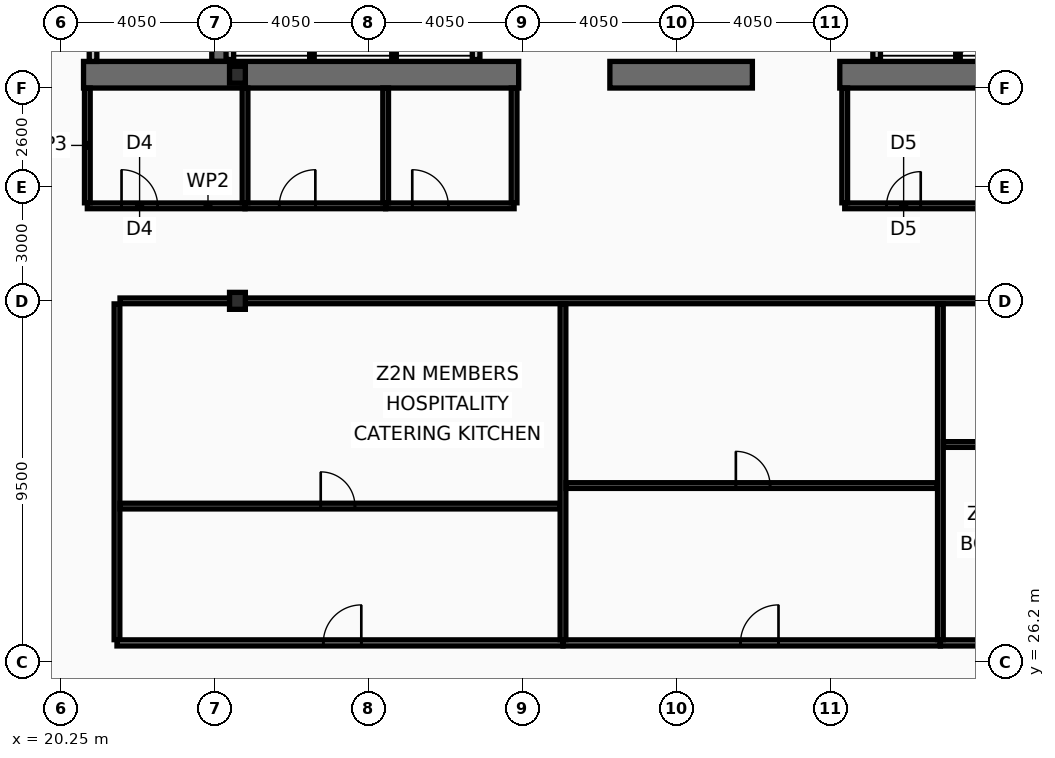
"""IFC4 building model, lengths in metres.
Left out: names, types, materials, properties, quantities, classifications, styles, units other than length and angle.
Written with IfcOpenShell. Run it as: python <this file> out.ifc"""

import sys

from ifc_helpers import new_model, si_unit, direction, frame, frame_2d, origin, origin_2d, place, context, subcontext, project, spatial, rectangle, i_section, extrude, element, fill, save


model = new_model("IFC4")
c1 = context("Model", 3, precision=1e-05, world=origin(), true_north=direction((0.0, 1.0)))
c2 = subcontext(c1, "Body", "Model", "MODEL_VIEW")
j1 = project(units=[si_unit("LENGTHUNIT", "METRE"), si_unit("PLANEANGLEUNIT", "RADIAN")], contexts=[c1])
p1 = place(None, origin())
s1 = spatial("IfcSite", under=j1, at=p1, CompositionType="ELEMENT")
p2 = place(p1, origin())
s2 = spatial("IfcBuilding", under=s1, at=p2, CompositionType="ELEMENT")
p3 = place(p2, frame((0.0, 0.0, 143.4)))
s3 = spatial("IfcBuildingStorey", under=s2, at=p3, CompositionType="ELEMENT", Elevation=143.4)
p4 = place(p3, frame((24.45, 42.0, 0.0), z_axis=(0.0, 0.0, 1.0), x_axis=(0.0, 1.0, 0.0)))
e1 = element("IfcWall", 1, at=p4, inside=s3, PredefinedType="SHEAR", context=c2, shape_type="SweptSolid", body=[
    extrude(rectangle(XDim=11.0, YDim=0.45, at=frame_2d((5.5, 0.0))), origin(), (0.0, 0.0, 1.0), 3.44),
])
p5 = place(p3, frame((32.3, 41.65, 0.0), z_axis=(0.0, 0.0, 1.0), x_axis=(-1.0, 0.0, 0.0)))
e2 = element("IfcWall", 2, at=p5, inside=s3, PredefinedType="SHEAR", context=c2, shape_type="SweptSolid", body=[
    extrude(rectangle(XDim=11.45, YDim=0.7, at=frame_2d((5.725, 0.0))), origin(), (0.0, 0.0, 1.0), 3.44),
])
p6 = place(p3, frame((38.45, 41.65, 0.0), z_axis=(0.0, 0.0, 1.0), x_axis=(-1.0, 0.0, 0.0)))
e3 = element("IfcWall", 3, at=p6, inside=s3, PredefinedType="SHEAR", context=c2, shape_type="SweptSolid", body=[
    extrude(rectangle(XDim=3.75, YDim=0.7, at=frame_2d((1.875, 0.0))), origin(), (0.0, 0.0, 1.0), 3.44),
])
p7 = place(p3, frame((52.05, 41.65, 0.0), z_axis=(0.0, 0.0, 1.0), x_axis=(-1.0, 0.0, 0.0)))
e4 = element("IfcWall", 4, at=p7, inside=s3, PredefinedType="SHEAR", context=c2, shape_type="SweptSolid", body=[
    extrude(rectangle(XDim=11.3, YDim=0.7, at=frame_2d((5.65, 0.0))), origin(), (0.0, 0.0, 1.0), 3.44),
])
for number, where, z_axis, x_axis in (
    (5, (24.9, 35.7, 0.0), (0.0, 0.0, 1.0), (1.0, 0.0, 0.0)),
    (6, (24.9, 41.65, 0.0), (0.0, 0.0, 1.0), (1.0, 0.0, 0.0)),
):
    element("IfcColumn", number, at=place(p3, frame(where, z_axis=z_axis, x_axis=x_axis)), inside=s3, PredefinedType="COLUMN", context=c2, shape_type="SweptSolid", body=[
        extrude(i_section(OverallWidth=0.416, OverallDepth=0.446, WebThickness=0.039, FlangeThickness=0.063, at=origin_2d()), origin(), (0.0, 0.0, 1.0), 3.6),
    ])
p8 = place(p3, frame((21.1, 42.0, 0.0), z_axis=(0.0, 0.0, 1.0), x_axis=(0.0, 1.0, 0.0)))
e7 = element("IfcWall", 7, at=p8, inside=s3, PredefinedType="PARTITIONING", context=c2, shape_type="SweptSolid", body=[
    extrude(rectangle(XDim=2.495, YDim=0.2, at=frame_2d((1.248, 0.0))), origin(), (0.0, 0.0, 1.0), 3.44),
])
p9 = place(p8, frame((0.38, 0.0, 0.0)))
e8 = element("IfcOpeningElement", 8, at=p9, cuts=e7, PredefinedType="OPENING", context=c2, shape_type="SweptSolid", body=[
    extrude(rectangle(XDim=1.05, YDim=2.15, at=frame_2d((0.525, 1.075))), frame((0.0, 0.11, 0.0), z_axis=(0.0, -1.0, 0.0), x_axis=(1.0, 0.0, 0.0)), (0.0, 0.0, 1.0), 0.22),
])
for number, where, z_axis, x_axis in (
    (9, (24.7, 42.05, 0.0), (0.0, 0.0, 1.0), (0.0, 1.0, 0.0)),
    (10, (31.18, 42.05, 0.0), (0.0, 0.0, 1.0), (0.0, 1.0, 0.0)),
):
    element("IfcWall", number, at=place(p3, frame(where, z_axis=z_axis, x_axis=x_axis)), inside=s3, PredefinedType="PARTITIONING", context=c2, shape_type="SweptSolid", body=[
        extrude(rectangle(XDim=2.2, YDim=0.2, at=frame_2d((1.1, 0.0))), origin(), (0.0, 0.0, 1.0), 3.44),
    ])
for number, where, z_axis, x_axis in (
    (11, (26.86, 42.05, 0.0), (0.0, 0.0, 1.0), (0.0, 1.0, 0.0)),
    (12, (29.02, 42.05, 0.0), (0.0, 0.0, 1.0), (0.0, 1.0, 0.0)),
):
    element("IfcWall", number, at=place(p3, frame(where, z_axis=z_axis, x_axis=x_axis)), inside=s3, PredefinedType="PARTITIONING", context=c2, shape_type="SweptSolid", body=[
        extrude(rectangle(XDim=2.2, YDim=0.12, at=frame_2d((1.1, 0.0))), origin(), (0.0, 0.0, 1.0), 3.44),
    ])
p10 = place(p3, frame((41.72, 42.05, 0.0), z_axis=(0.0, 0.0, 1.0), x_axis=(0.0, 1.0, 0.0)))
e13 = element("IfcWall", 13, at=p10, inside=s3, PredefinedType="PARTITIONING", context=c2, shape_type="SweptSolid", body=[
    extrude(rectangle(XDim=2.195, YDim=0.2, at=frame_2d((1.098, 0.0))), origin(), (0.0, 0.0, 1.0), 3.44),
])
p11 = place(p3, frame((43.86, 42.05, 0.0), z_axis=(0.0, 0.0, 1.0), x_axis=(0.0, 1.0, 0.0)))
e14 = element("IfcWall", 14, at=p11, inside=s3, PredefinedType="PARTITIONING", context=c2, shape_type="SweptSolid", body=[
    extrude(rectangle(XDim=2.195, YDim=0.12, at=frame_2d((1.098, 0.0))), origin(), (0.0, 0.0, 1.0), 3.44),
])
p12 = place(p3, frame((20.95, 38.2, 0.0), z_axis=(0.0, 0.0, 1.0), x_axis=(1.0, 0.0, 0.0)))
e15 = element("IfcWall", 15, at=p12, inside=s3, PredefinedType="PARTITIONING", context=c2, shape_type="SweptSolid", body=[
    extrude(rectangle(XDim=4.15, YDim=0.15, at=frame_2d((2.075, 0.0))), origin(), (0.0, 0.0, 1.0), 2.73),
])
p13 = place(p12, frame((0.9, 0.0, 0.0)))
e16 = element("IfcOpeningElement", 16, at=p13, cuts=e15, PredefinedType="OPENING", context=c2, shape_type="SweptSolid", body=[
    extrude(rectangle(XDim=0.95, YDim=2.05, at=frame_2d((0.475, 1.025))), frame((0.0, 0.085, 0.0), z_axis=(0.0, -1.0, 0.0), x_axis=(1.0, 0.0, 0.0)), (0.0, 0.0, 1.0), 0.17),
])
p14 = place(p3, frame((25.1, 38.2, 0.0), z_axis=(0.0, 0.0, 1.0), x_axis=(1.0, 0.0, 0.0)))
e17 = element("IfcWall", 17, at=p14, inside=s3, PredefinedType="PARTITIONING", context=c2, shape_type="SweptSolid", body=[
    extrude(rectangle(XDim=3.7, YDim=0.15, at=frame_2d((1.85, 0.0))), origin(), (0.0, 0.0, 1.0), 2.73),
])
p15 = place(p14, frame((0.9, 0.0, 0.0)))
e18 = element("IfcOpeningElement", 18, at=p15, cuts=e17, PredefinedType="OPENING", context=c2, shape_type="SweptSolid", body=[
    extrude(rectangle(XDim=0.95, YDim=2.05, at=frame_2d((0.475, 1.025))), frame((0.0, 0.085, 0.0), z_axis=(0.0, -1.0, 0.0), x_axis=(1.0, 0.0, 0.0)), (0.0, 0.0, 1.0), 0.17),
])
p16 = place(p3, frame((28.8, 38.2, 0.0), z_axis=(0.0, 0.0, 1.0), x_axis=(1.0, 0.0, 0.0)))
e19 = element("IfcWall", 19, at=p16, inside=s3, PredefinedType="PARTITIONING", context=c2, shape_type="SweptSolid", body=[
    extrude(rectangle(XDim=3.38, YDim=0.15, at=frame_2d((1.69, 0.0))), origin(), (0.0, 0.0, 1.0), 2.73),
])
p17 = place(p16, frame((0.7, 0.0, 0.0)))
e20 = element("IfcOpeningElement", 20, at=p17, cuts=e19, PredefinedType="OPENING", context=c2, shape_type="SweptSolid", body=[
    extrude(rectangle(XDim=0.95, YDim=2.05, at=frame_2d((0.475, 1.025))), frame((0.0, 0.085, 0.0), z_axis=(0.0, -1.0, 0.0), x_axis=(1.0, 0.0, 0.0)), (0.0, 0.0, 1.0), 0.17),
])
p18 = place(p3, frame((20.95, 38.28, 0.0), z_axis=(0.0, 0.0, 1.0), x_axis=(0.0, 1.0, 0.0)))
e21 = element("IfcWall", 21, at=p18, inside=s3, PredefinedType="PARTITIONING", context=c2, shape_type="SweptSolid", body=[
    extrude(rectangle(XDim=3.02, YDim=0.15, at=frame_2d((1.51, 0.0))), origin(), (0.0, 0.0, 1.0), 3.44),
])
p19 = place(p3, frame((25.1, 38.28, 0.0), z_axis=(0.0, 0.0, 1.0), x_axis=(0.0, 1.0, 0.0)))
e22 = element("IfcWall", 22, at=p19, inside=s3, PredefinedType="PARTITIONING", context=c2, shape_type="SweptSolid", body=[
    extrude(rectangle(XDim=3.02, YDim=0.15, at=frame_2d((1.51, 0.0))), origin(), (0.0, 0.0, 1.0), 2.73),
])
for number, where, z_axis, x_axis in (
    (23, (28.8, 38.28, 0.0), (0.0, 0.0, 1.0), (0.0, 1.0, 0.0)),
    (24, (32.18, 38.28, 0.0), (0.0, 0.0, 1.0), (0.0, 1.0, 0.0)),
):
    element("IfcWall", number, at=place(p3, frame(where, z_axis=z_axis, x_axis=x_axis)), inside=s3, PredefinedType="PARTITIONING", context=c2, shape_type="SweptSolid", body=[
        extrude(rectangle(XDim=3.02, YDim=0.15, at=frame_2d((1.51, 0.0))), origin(), (0.0, 0.0, 1.0), 3.44),
    ])
p20 = place(p3, frame((40.88, 38.2, 0.0), z_axis=(0.0, 0.0, 1.0), x_axis=(1.0, 0.0, 0.0)))
e25 = element("IfcWall", 25, at=p20, inside=s3, PredefinedType="PARTITIONING", context=c2, shape_type="SweptSolid", body=[
    extrude(rectangle(XDim=6.92, YDim=0.15, at=frame_2d((3.46, 0.0))), origin(), (0.0, 0.0, 1.0), 2.73),
])
p21 = place(p20, frame((1.1, 0.0, 0.0)))
e26 = element("IfcOpeningElement", 26, at=p21, cuts=e25, PredefinedType="OPENING", context=c2, shape_type="SweptSolid", body=[
    extrude(rectangle(XDim=0.9, YDim=2.05, at=frame_2d((0.45, 1.025))), frame((0.0, 0.085, 0.0), z_axis=(0.0, -1.0, 0.0), x_axis=(1.0, 0.0, 0.0)), (0.0, 0.0, 1.0), 0.17),
])
p22 = place(p3, frame((40.88, 38.28, 0.0), z_axis=(0.0, 0.0, 1.0), x_axis=(0.0, 1.0, 0.0)))
e27 = element("IfcWall", 27, at=p22, inside=s3, PredefinedType="PARTITIONING", context=c2, shape_type="SweptSolid", body=[
    extrude(rectangle(XDim=3.02, YDim=0.15, at=frame_2d((1.51, 0.0))), origin(), (0.0, 0.0, 1.0), 3.44),
])
p23 = place(p3, frame((21.73, 26.785, 0.0), z_axis=(0.0, 0.0, 1.0), x_axis=(0.0, 1.0, 0.0)))
e28 = element("IfcWall", 28, at=p23, inside=s3, PredefinedType="PARTITIONING", context=c2, shape_type="SweptSolid", body=[
    extrude(rectangle(XDim=8.835, YDim=0.15, at=frame_2d((4.417, 0.0))), origin(), (0.0, 0.0, 1.0), 2.93),
])
p24 = place(p3, frame((21.81, 35.7, 0.0), z_axis=(0.0, 0.0, 1.0), x_axis=(1.0, 0.0, 0.0)))
e29 = element("IfcWall", 29, at=p24, inside=s3, PredefinedType="PARTITIONING", context=c2, shape_type="SweptSolid", body=[
    extrude(rectangle(XDim=44.995, YDim=0.15, at=frame_2d((22.498, 0.0))), origin(), (0.0, 0.0, 1.0), 2.73),
])
p25 = place(p3, frame((21.73, 26.7, 0.0), z_axis=(0.0, 0.0, 1.0), x_axis=(1.0, 0.0, 0.0)))
e30 = element("IfcWall", 30, at=p25, inside=s3, PredefinedType="PARTITIONING", context=c2, shape_type="SweptSolid", body=[
    extrude(rectangle(XDim=11.736, YDim=0.16, at=frame_2d((5.868, 0.0))), origin(), (0.0, 0.0, 1.0), 2.73),
])
p26 = place(p25, frame((5.429, 0.0, 0.0)))
e31 = element("IfcOpeningElement", 31, at=p26, cuts=e30, PredefinedType="OPENING", context=c2, shape_type="SweptSolid", body=[
    extrude(rectangle(XDim=1.0, YDim=2.05, at=frame_2d((0.5, 1.025))), frame((0.0, 0.09, 0.0), z_axis=(0.0, -1.0, 0.0), x_axis=(1.0, 0.0, 0.0)), (0.0, 0.0, 1.0), 0.18),
])
p27 = place(p3, frame((21.81, 30.3, 0.0), z_axis=(0.0, 0.0, 1.0), x_axis=(1.0, 0.0, 0.0)))
e32 = element("IfcWall", 32, at=p27, inside=s3, PredefinedType="PARTITIONING", context=c2, shape_type="SweptSolid", body=[
    extrude(rectangle(XDim=11.576, YDim=0.15, at=frame_2d((5.788, 0.0))), origin(), (0.0, 0.0, 1.0), 2.73),
])
p28 = place(p27, frame((5.281, 0.0, 0.0)))
e33 = element("IfcOpeningElement", 33, at=p28, cuts=e32, PredefinedType="OPENING", context=c2, shape_type="SweptSolid", body=[
    extrude(rectangle(XDim=0.9, YDim=2.05, at=frame_2d((0.45, 1.025))), frame((0.0, 0.085, 0.0), z_axis=(0.0, -1.0, 0.0), x_axis=(1.0, 0.0, 0.0)), (0.0, 0.0, 1.0), 0.17),
])
p29 = place(p3, frame((33.466, 26.7, 0.0), z_axis=(0.0, 0.0, 1.0), x_axis=(1.0, 0.0, 0.0)))
e34 = element("IfcWall", 34, at=p29, inside=s3, PredefinedType="PARTITIONING", context=c2, shape_type="SweptSolid", body=[
    extrude(rectangle(XDim=9.931, YDim=0.16, at=frame_2d((4.965, 0.0))), origin(), (0.0, 0.0, 1.0), 2.73),
])
p30 = place(p29, frame((4.671, 0.0, 0.0)))
e35 = element("IfcOpeningElement", 35, at=p30, cuts=e34, PredefinedType="OPENING", context=c2, shape_type="SweptSolid", body=[
    extrude(rectangle(XDim=1.0, YDim=2.05, at=frame_2d((0.5, 1.025))), frame((0.0, 0.09, 0.0), z_axis=(0.0, -1.0, 0.0), x_axis=(1.0, 0.0, 0.0)), (0.0, 0.0, 1.0), 0.18),
])
p31 = place(p3, frame((33.466, 26.785, 0.0), z_axis=(0.0, 0.0, 1.0), x_axis=(0.0, 1.0, 0.0)))
e36 = element("IfcWall", 36, at=p31, inside=s3, PredefinedType="PARTITIONING", context=c2, shape_type="SweptSolid", body=[
    extrude(rectangle(XDim=8.835, YDim=0.15, at=frame_2d((4.417, 0.0))), origin(), (0.0, 0.0, 1.0), 2.93),
])
p32 = place(p3, frame((33.546, 30.84, 0.0), z_axis=(0.0, 0.0, 1.0), x_axis=(1.0, 0.0, 0.0)))
e37 = element("IfcWall", 37, at=p32, inside=s3, PredefinedType="PARTITIONING", context=c2, shape_type="SweptSolid", body=[
    extrude(rectangle(XDim=9.771, YDim=0.15, at=frame_2d((4.885, 0.0))), origin(), (0.0, 0.0, 1.0), 2.73),
])
p33 = place(p32, frame((4.469, 0.0, 0.0)))
e38 = element("IfcOpeningElement", 38, at=p33, cuts=e37, PredefinedType="OPENING", context=c2, shape_type="SweptSolid", body=[
    extrude(rectangle(XDim=0.9, YDim=2.05, at=frame_2d((0.45, 1.025))), frame((0.0, 0.085, 0.0), z_axis=(0.0, -1.0, 0.0), x_axis=(1.0, 0.0, 0.0)), (0.0, 0.0, 1.0), 0.17),
])
p34 = place(p3, frame((43.397, 26.7, 0.0), z_axis=(0.0, 0.0, 1.0), x_axis=(1.0, 0.0, 0.0)))
e39 = element("IfcWall", 39, at=p34, inside=s3, PredefinedType="PARTITIONING", context=c2, shape_type="SweptSolid", body=[
    extrude(rectangle(XDim=10.833, YDim=0.16, at=frame_2d((5.417, 0.0))), origin(), (0.0, 0.0, 1.0), 2.73),
])
p35 = place(p34, frame((5.05, 0.0, 0.0)))
e40 = element("IfcOpeningElement", 40, at=p35, cuts=e39, PredefinedType="OPENING", context=c2, shape_type="SweptSolid", body=[
    extrude(rectangle(XDim=1.0, YDim=2.05, at=frame_2d((0.5, 1.025))), frame((0.0, 0.09, 0.0), z_axis=(0.0, -1.0, 0.0), x_axis=(1.0, 0.0, 0.0)), (0.0, 0.0, 1.0), 0.18),
])
p36 = place(p3, frame((43.397, 26.785, 0.0), z_axis=(0.0, 0.0, 1.0), x_axis=(0.0, 1.0, 0.0)))
e41 = element("IfcWall", 41, at=p36, inside=s3, PredefinedType="PARTITIONING", context=c2, shape_type="SweptSolid", body=[
    extrude(rectangle(XDim=8.835, YDim=0.15, at=frame_2d((4.417, 0.0))), origin(), (0.0, 0.0, 1.0), 2.93),
])
p37 = place(p3, frame((43.477, 31.92, 0.0), z_axis=(0.0, 0.0, 1.0), x_axis=(1.0, 0.0, 0.0)))
e42 = element("IfcWall", 42, at=p37, inside=s3, PredefinedType="PARTITIONING", context=c2, shape_type="SweptSolid", body=[
    extrude(rectangle(XDim=10.674, YDim=0.15, at=frame_2d((5.337, 0.0))), origin(), (0.0, 0.0, 1.0), 2.73),
])
p38 = place(p37, frame((4.875, 0.0, 0.0)))
e43 = element("IfcOpeningElement", 43, at=p38, cuts=e42, PredefinedType="OPENING", context=c2, shape_type="SweptSolid", body=[
    extrude(rectangle(XDim=0.9, YDim=2.05, at=frame_2d((0.45, 1.025))), frame((0.0, 0.085, 0.0), z_axis=(0.0, -1.0, 0.0), x_axis=(1.0, 0.0, 0.0)), (0.0, 0.0, 1.0), 0.17),
])
p39 = place(p13, origin())
e44 = element("IfcDoor", 44, at=p39, inside=s3, OperationType="SINGLE_SWING_LEFT", PredefinedType="DOOR", context=c2, shape_type="SweptSolid", body=[
    extrude(rectangle(XDim=0.95, YDim=2.05, at=frame_2d((0.475, 1.025))), frame((0.0, 0.025, 0.0), z_axis=(0.0, -1.0, 0.0), x_axis=(1.0, 0.0, 0.0)), (0.0, 0.0, 1.0), 0.05),
])
fill(e16, e44)
p40 = place(p15, origin())
e45 = element("IfcDoor", 45, at=p40, inside=s3, OperationType="SINGLE_SWING_RIGHT", PredefinedType="DOOR", context=c2, shape_type="SweptSolid", body=[
    extrude(rectangle(XDim=0.95, YDim=2.05, at=frame_2d((0.475, 1.025))), frame((0.0, 0.025, 0.0), z_axis=(0.0, -1.0, 0.0), x_axis=(1.0, 0.0, 0.0)), (0.0, 0.0, 1.0), 0.05),
])
fill(e18, e45)
p41 = place(p17, origin())
e46 = element("IfcDoor", 46, at=p41, inside=s3, OperationType="SINGLE_SWING_LEFT", PredefinedType="DOOR", context=c2, shape_type="SweptSolid", body=[
    extrude(rectangle(XDim=0.95, YDim=2.05, at=frame_2d((0.475, 1.025))), frame((0.0, 0.025, 0.0), z_axis=(0.0, -1.0, 0.0), x_axis=(1.0, 0.0, 0.0)), (0.0, 0.0, 1.0), 0.05),
])
fill(e20, e46)
p42 = place(p21, origin())
e47 = element("IfcDoor", 47, at=p42, inside=s3, OperationType="SINGLE_SWING_RIGHT", PredefinedType="DOOR", context=c2, shape_type="SweptSolid", body=[
    extrude(rectangle(XDim=0.9, YDim=2.05, at=frame_2d((0.45, 1.025))), frame((0.0, 0.025, 0.0), z_axis=(0.0, -1.0, 0.0), x_axis=(1.0, 0.0, 0.0)), (0.0, 0.0, 1.0), 0.05),
])
fill(e26, e47)
p43 = place(p26, origin())
e48 = element("IfcDoor", 48, at=p43, inside=s3, OperationType="SINGLE_SWING_RIGHT", PredefinedType="DOOR", context=c2, shape_type="SweptSolid", body=[
    extrude(rectangle(XDim=1.0, YDim=2.05, at=frame_2d((0.5, 1.025))), frame((0.0, 0.025, 0.0), z_axis=(0.0, -1.0, 0.0), x_axis=(1.0, 0.0, 0.0)), (0.0, 0.0, 1.0), 0.05),
])
fill(e31, e48)
p44 = place(p28, origin())
e49 = element("IfcDoor", 49, at=p44, inside=s3, OperationType="SINGLE_SWING_LEFT", PredefinedType="DOOR", context=c2, shape_type="SweptSolid", body=[
    extrude(rectangle(XDim=0.9, YDim=2.05, at=frame_2d((0.45, 1.025))), frame((0.0, 0.025, 0.0), z_axis=(0.0, -1.0, 0.0), x_axis=(1.0, 0.0, 0.0)), (0.0, 0.0, 1.0), 0.05),
])
fill(e33, e49)
p45 = place(p30, origin())
e50 = element("IfcDoor", 50, at=p45, inside=s3, OperationType="SINGLE_SWING_RIGHT", PredefinedType="DOOR", context=c2, shape_type="SweptSolid", body=[
    extrude(rectangle(XDim=1.0, YDim=2.05, at=frame_2d((0.5, 1.025))), frame((0.0, 0.025, 0.0), z_axis=(0.0, -1.0, 0.0), x_axis=(1.0, 0.0, 0.0)), (0.0, 0.0, 1.0), 0.05),
])
fill(e35, e50)
p46 = place(p33, origin())
e51 = element("IfcDoor", 51, at=p46, inside=s3, OperationType="SINGLE_SWING_LEFT", PredefinedType="DOOR", context=c2, shape_type="SweptSolid", body=[
    extrude(rectangle(XDim=0.9, YDim=2.05, at=frame_2d((0.45, 1.025))), frame((0.0, 0.025, 0.0), z_axis=(0.0, -1.0, 0.0), x_axis=(1.0, 0.0, 0.0)), (0.0, 0.0, 1.0), 0.05),
])
fill(e38, e51)
save(model, sys.argv[1])
